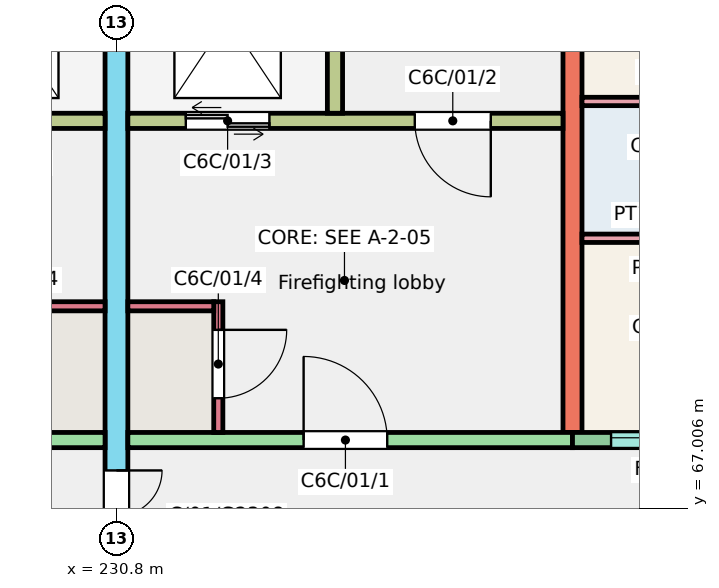
"""IFC4 building model, lengths in metres.
Left out: names, types, materials, properties, quantities, classifications, styles, units other than length and angle.
Written with IfcOpenShell. Run it as: python <this file> out.ifc"""

import sys

from ifc_helpers import new_model, si_unit, direction, frame, frame_2d, origin, place, context, subcontext, project, spatial, rectangle, extrude, element, fill, save


model = new_model("IFC4")
c1 = context("Model", 3, precision=1e-05, world=origin(), true_north=direction((0.0, 1.0)))
c2 = subcontext(c1, "Body", "Model", "MODEL_VIEW")
j1 = project(units=[si_unit("LENGTHUNIT", "METRE"), si_unit("PLANEANGLEUNIT", "RADIAN")], contexts=[c1])
p1 = place(None, origin())
s1 = spatial("IfcSite", under=j1, at=p1, CompositionType="ELEMENT")
p2 = place(p1, origin())
s2 = spatial("IfcBuilding", under=s1, at=p2, CompositionType="ELEMENT")
p3 = place(p2, frame((0.0, 0.0, 3.0)))
s3 = spatial("IfcBuildingStorey", under=s2, at=p3, CompositionType="ELEMENT", Elevation=3.0)
p4 = place(p3, frame((230.8, 66.0, 0.0), z_axis=(0.0, 0.0, 1.0), x_axis=(0.0, 1.0, 0.0)))
e1 = element("IfcWall", 1, at=p4, inside=s3, PredefinedType="SHEAR", context=c2, shape_type="SweptSolid", body=[
    extrude(rectangle(XDim=11.0, YDim=0.3, at=frame_2d((5.5, 0.0))), origin(), (0.0, 0.0, 1.0), 3.0),
])
p5 = place(p4, frame((0.3, 0.0, 0.0)))
e2 = element("IfcOpeningElement", 2, at=p5, cuts=e1, PredefinedType="OPENING", context=c2, shape_type="SweptSolid", body=[
    extrude(rectangle(XDim=1.2, YDim=2.1, at=frame_2d((0.6, 1.05))), frame((0.0, 0.16, 0.0), z_axis=(0.0, -1.0, 0.0), x_axis=(1.0, 0.0, 0.0)), (0.0, 0.0, 1.0), 0.32),
])
p6 = place(p3, frame((236.8, 68.0, 0.0), z_axis=(0.0, 0.0, 1.0), x_axis=(0.0, 1.0, 0.0)))
e3 = element("IfcWall", 3, at=p6, inside=s3, PredefinedType="SHEAR", context=c2, shape_type="SweptSolid", body=[
    extrude(rectangle(XDim=9.0, YDim=0.25, at=frame_2d((4.5, 0.0))), origin(), (0.0, 0.0, 1.0), 3.0),
])
p7 = place(p3, frame((224.8, 67.9, 0.0), z_axis=(0.0, 0.0, 1.0), x_axis=(1.0, 0.0, 0.0)))
e4 = element("IfcWall", 4, at=p7, inside=s3, PredefinedType="SHEAR", context=c2, shape_type="SweptSolid", body=[
    extrude(rectangle(XDim=5.85, YDim=0.2, at=frame_2d((2.925, 0.0))), origin(), (0.0, 0.0, 1.0), 3.0),
])
p8 = place(p7, frame((2.438, 0.0, 0.0)))
e5 = element("IfcOpeningElement", 5, at=p8, cuts=e4, PredefinedType="OPENING", context=c2, shape_type="SweptSolid", body=[
    extrude(rectangle(XDim=1.1, YDim=2.1, at=frame_2d((0.55, 1.05))), frame((0.0, 0.11, 0.0), z_axis=(0.0, -1.0, 0.0), x_axis=(1.0, 0.0, 0.0)), (0.0, 0.0, 1.0), 0.22),
])
p9 = place(p3, frame((224.925, 72.1, 0.0), z_axis=(0.0, 0.0, 1.0), x_axis=(1.0, 0.0, 0.0)))
e6 = element("IfcWall", 6, at=p9, inside=s3, PredefinedType="SHEAR", context=c2, shape_type="SweptSolid", body=[
    extrude(rectangle(XDim=5.725, YDim=0.2, at=frame_2d((2.862, 0.0))), origin(), (0.0, 0.0, 1.0), 3.0),
])
p10 = place(p9, frame((0.95, 0.0, 0.0)))
e7 = element("IfcOpeningElement", 7, at=p10, cuts=e6, PredefinedType="OPENING", context=c2, shape_type="SweptSolid", body=[
    extrude(rectangle(XDim=1.0, YDim=2.1, at=frame_2d((0.5, 1.05))), frame((0.0, 0.11, 0.0), z_axis=(0.0, -1.0, 0.0), x_axis=(1.0, 0.0, 0.0)), (0.0, 0.0, 1.0), 0.22),
])
p11 = place(p9, frame((3.863, 0.0, 0.0)))
e8 = element("IfcOpeningElement", 8, at=p11, cuts=e6, PredefinedType="OPENING", context=c2, shape_type="SweptSolid", body=[
    extrude(rectangle(XDim=1.1, YDim=2.1, at=frame_2d((0.55, 1.05))), frame((0.0, 0.11, 0.0), z_axis=(0.0, -1.0, 0.0), x_axis=(1.0, 0.0, 0.0)), (0.0, 0.0, 1.0), 0.22),
])
p12 = place(p3, frame((229.52, 69.66, 0.0), z_axis=(0.0, 0.0, 1.0), x_axis=(1.0, 0.0, 0.0)))
e9 = element("IfcWall", 9, at=p12, inside=s3, PredefinedType="SHEAR", context=c2, shape_type="SweptSolid", body=[
    extrude(rectangle(XDim=1.13, YDim=0.12, at=frame_2d((0.565, 0.0))), origin(), (0.0, 0.0, 1.0), 3.0),
])
p13 = place(p3, frame((230.95, 67.9, 0.0), z_axis=(0.0, 0.0, 1.0), x_axis=(1.0, 0.0, 0.0)))
e10 = element("IfcWall", 10, at=p13, inside=s3, PredefinedType="SHEAR", context=c2, shape_type="SweptSolid", body=[
    extrude(rectangle(XDim=5.85, YDim=0.2, at=frame_2d((2.925, 0.0))), origin(), (0.0, 0.0, 1.0), 3.0),
])
p14 = place(p13, frame((2.312, 0.0, 0.0)))
e11 = element("IfcOpeningElement", 11, at=p14, cuts=e10, PredefinedType="OPENING", context=c2, shape_type="SweptSolid", body=[
    extrude(rectangle(XDim=1.1, YDim=2.1, at=frame_2d((0.55, 1.05))), frame((0.0, 0.11, 0.0), z_axis=(0.0, -1.0, 0.0), x_axis=(1.0, 0.0, 0.0)), (0.0, 0.0, 1.0), 0.22),
])
p15 = place(p3, frame((230.95, 72.1, 0.0), z_axis=(0.0, 0.0, 1.0), x_axis=(1.0, 0.0, 0.0)))
e12 = element("IfcWall", 12, at=p15, inside=s3, PredefinedType="SHEAR", context=c2, shape_type="SweptSolid", body=[
    extrude(rectangle(XDim=5.725, YDim=0.2, at=frame_2d((2.863, 0.0))), origin(), (0.0, 0.0, 1.0), 3.0),
])
p16 = place(p15, frame((3.775, 0.0, 0.0)))
e13 = element("IfcOpeningElement", 13, at=p16, cuts=e12, PredefinedType="OPENING", context=c2, shape_type="SweptSolid", body=[
    extrude(rectangle(XDim=1.0, YDim=2.1, at=frame_2d((0.5, 1.05))), frame((0.0, 0.11, 0.0), z_axis=(0.0, -1.0, 0.0), x_axis=(1.0, 0.0, 0.0)), (0.0, 0.0, 1.0), 0.22),
])
p17 = place(p15, frame((0.762, 0.0, 0.0)))
e14 = element("IfcOpeningElement", 14, at=p17, cuts=e12, PredefinedType="OPENING", context=c2, shape_type="SweptSolid", body=[
    extrude(rectangle(XDim=1.1, YDim=2.1, at=frame_2d((0.55, 1.05))), frame((0.0, 0.11, 0.0), z_axis=(0.0, -1.0, 0.0), x_axis=(1.0, 0.0, 0.0)), (0.0, 0.0, 1.0), 0.22),
])
p18 = place(p3, frame((233.675, 72.2, 0.0), z_axis=(0.0, 0.0, 1.0), x_axis=(0.0, 1.0, 0.0)))
e15 = element("IfcWall", 15, at=p18, inside=s3, PredefinedType="SHEAR", context=c2, shape_type="SweptSolid", body=[
    extrude(rectangle(XDim=4.8, YDim=0.2, at=frame_2d((2.4, 0.0))), origin(), (0.0, 0.0, 1.0), 3.0),
])
p19 = place(p3, frame((232.14, 68.0, 0.0), z_axis=(0.0, 0.0, 1.0), x_axis=(0.0, 1.0, 0.0)))
e16 = element("IfcWall", 16, at=p19, inside=s3, PredefinedType="SHEAR", context=c2, shape_type="SweptSolid", body=[
    extrude(rectangle(XDim=1.72, YDim=0.12, at=frame_2d((0.86, 0.0))), origin(), (0.0, 0.0, 1.0), 3.0),
])
p20 = place(p19, frame((0.45, 0.0, 0.0)))
e17 = element("IfcOpeningElement", 17, at=p20, cuts=e16, PredefinedType="OPENING", context=c2, shape_type="SweptSolid", body=[
    extrude(rectangle(XDim=0.9, YDim=2.1, at=frame_2d((0.45, 1.05))), frame((0.0, 0.07, 0.0), z_axis=(0.0, -1.0, 0.0), x_axis=(1.0, 0.0, 0.0)), (0.0, 0.0, 1.0), 0.14),
])
p21 = place(p3, frame((230.95, 69.66, 0.0), z_axis=(0.0, 0.0, 1.0), x_axis=(1.0, 0.0, 0.0)))
e18 = element("IfcWall", 18, at=p21, inside=s3, PredefinedType="SHEAR", context=c2, shape_type="SweptSolid", body=[
    extrude(rectangle(XDim=1.13, YDim=0.12, at=frame_2d((0.565, 0.0))), origin(), (0.0, 0.0, 1.0), 3.0),
])
p22 = place(p3, frame((236.8, 67.9, 0.0), z_axis=(0.0, 0.0, 1.0), x_axis=(1.0, 0.0, 0.0)))
e19 = element("IfcWall", 19, at=p22, inside=s3, PredefinedType="SOLIDWALL", context=c2, shape_type="SweptSolid", body=[
    extrude(rectangle(XDim=3.6, YDim=0.2, at=frame_2d((1.8, 0.0))), origin(), (0.0, 0.0, 1.0), 3.0),
])
p23 = place(p22, frame((0.508, 0.0, 1.1)))
e20 = element("IfcOpeningElement", 20, at=p23, cuts=e19, PredefinedType="OPENING", context=c2, shape_type="SweptSolid", body=[
    extrude(rectangle(XDim=1.2, YDim=1.3, at=frame_2d((0.6, 0.65))), frame((0.0, 0.11, 0.0), z_axis=(0.0, -1.0, 0.0), x_axis=(1.0, 0.0, 0.0)), (0.0, 0.0, 1.0), 0.22),
])
p24 = place(p22, frame((2.35, 0.0, 0.0)))
e21 = element("IfcOpeningElement", 21, at=p24, cuts=e19, PredefinedType="OPENING", context=c2, shape_type="SweptSolid", body=[
    extrude(rectangle(XDim=1.0, YDim=2.1, at=frame_2d((0.5, 1.05))), frame((0.0, 0.11, 0.0), z_axis=(0.0, -1.0, 0.0), x_axis=(1.0, 0.0, 0.0)), (0.0, 0.0, 1.0), 0.22),
])
p25 = place(p3, frame((236.925, 70.555, 0.0), z_axis=(0.0, 0.0, 1.0), x_axis=(1.0, 0.0, 0.0)))
e22 = element("IfcWall", 22, at=p25, inside=s3, PredefinedType="PARTITIONING", context=c2, shape_type="SweptSolid", body=[
    extrude(rectangle(XDim=1.965, YDim=0.11, at=frame_2d((0.982, 0.0))), origin(), (0.0, 0.0, 1.0), 2.8),
])
p26 = place(p3, frame((236.925, 72.355, 0.0), z_axis=(0.0, 0.0, 1.0), x_axis=(1.0, 0.0, 0.0)))
e23 = element("IfcWall", 23, at=p26, inside=s3, PredefinedType="PARTITIONING", context=c2, shape_type="SweptSolid", body=[
    extrude(rectangle(XDim=3.375, YDim=0.11, at=frame_2d((1.688, 0.0))), origin(), (0.0, 0.0, 1.0), 2.8),
])
p27 = place(p26, frame((2.275, 0.0, 0.0)))
e24 = element("IfcOpeningElement", 24, at=p27, cuts=e23, PredefinedType="OPENING", context=c2, shape_type="SweptSolid", body=[
    extrude(rectangle(XDim=0.9, YDim=2.1, at=frame_2d((0.45, 1.05))), frame((0.0, 0.065, 0.0), z_axis=(0.0, -1.0, 0.0), x_axis=(1.0, 0.0, 0.0)), (0.0, 0.0, 1.0), 0.13),
])
p28 = place(p23, origin())
e25 = element("IfcWindow", 25, at=p28, inside=s3, PartitioningType="SINGLE_PANEL", PredefinedType="WINDOW", context=c2, shape_type="SweptSolid", body=[
    extrude(rectangle(XDim=1.2, YDim=1.3, at=frame_2d((0.6, 0.65))), frame((0.0, 0.06, 0.0), z_axis=(0.0, -1.0, 0.0), x_axis=(1.0, 0.0, 0.0)), (0.0, 0.0, 1.0), 0.06),
])
fill(e20, e25)
p29 = place(p14, origin())
e26 = element("IfcDoor", 26, at=p29, inside=s3, OperationType="SINGLE_SWING_LEFT", PredefinedType="DOOR", context=c2, shape_type="SweptSolid", body=[
    extrude(rectangle(XDim=1.1, YDim=2.1, at=frame_2d((0.55, 1.05))), frame((0.0, 0.025, 0.0), z_axis=(0.0, -1.0, 0.0), x_axis=(1.0, 0.0, 0.0)), (0.0, 0.0, 1.0), 0.05),
])
fill(e11, e26)
p30 = place(p16, origin())
e27 = element("IfcDoor", 27, at=p30, inside=s3, OperationType="SINGLE_SWING_RIGHT", PredefinedType="DOOR", context=c2, shape_type="SweptSolid", body=[
    extrude(rectangle(XDim=1.0, YDim=2.1, at=frame_2d((0.5, 1.05))), frame((0.0, 0.025, 0.0), z_axis=(0.0, -1.0, 0.0), x_axis=(1.0, 0.0, 0.0)), (0.0, 0.0, 1.0), 0.05),
])
fill(e13, e27)
p31 = place(p17, origin())
e28 = element("IfcDoor", 28, at=p31, inside=s3, OperationType="DOUBLE_DOOR_SLIDING", PredefinedType="DOOR", context=c2, shape_type="SweptSolid", body=[
    extrude(rectangle(XDim=1.1, YDim=2.1, at=frame_2d((0.55, 1.05))), frame((0.0, 0.025, 0.0), z_axis=(0.0, -1.0, 0.0), x_axis=(1.0, 0.0, 0.0)), (0.0, 0.0, 1.0), 0.05),
])
fill(e14, e28)
p32 = place(p20, origin())
e29 = element("IfcDoor", 29, at=p32, inside=s3, OperationType="SINGLE_SWING_RIGHT", PredefinedType="DOOR", context=c2, shape_type="SweptSolid", body=[
    extrude(rectangle(XDim=0.9, YDim=2.1, at=frame_2d((0.45, 1.05))), frame((0.0, 0.025, 0.0), z_axis=(0.0, -1.0, 0.0), x_axis=(1.0, 0.0, 0.0)), (0.0, 0.0, 1.0), 0.05),
])
fill(e17, e29)
p33 = place(p5, origin())
e30 = element("IfcDoor", 30, at=p33, inside=s3, OperationType="DOUBLE_DOOR_SINGLE_SWING", PredefinedType="DOOR", context=c2, shape_type="SweptSolid", body=[
    extrude(rectangle(XDim=1.2, YDim=2.1, at=frame_2d((0.6, 1.05))), frame((0.0, 0.025, 0.0), z_axis=(0.0, -1.0, 0.0), x_axis=(1.0, 0.0, 0.0)), (0.0, 0.0, 1.0), 0.05),
])
fill(e2, e30)
save(model, sys.argv[1])
